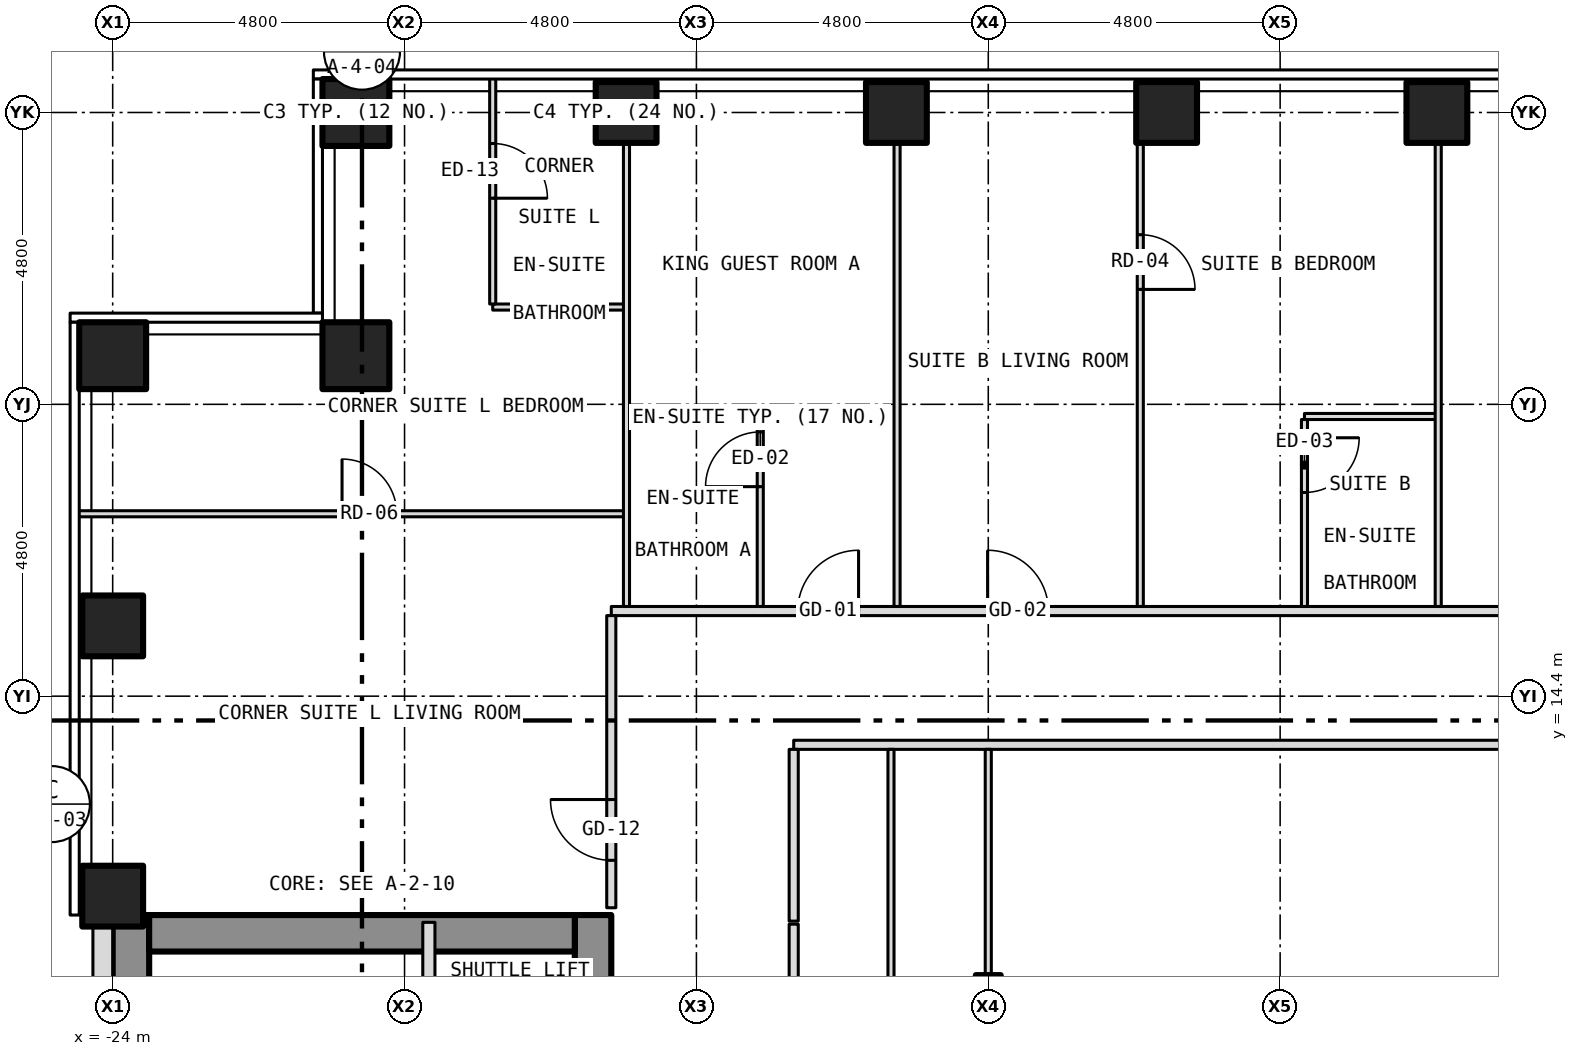
"""IFC4 building model, lengths in metres.
Left out: names, types, materials, properties, quantities, classifications, styles, units other than length and angle.
Written with IfcOpenShell. Run it as: python <this file> out.ifc"""

import sys

from ifc_helpers import new_model, si_unit, direction, frame, frame_2d, origin, origin_2d, place, context, subcontext, project, spatial, rectangle, hollow_rectangle, i_section, extrude, element, fill, save


model = new_model("IFC4")
c1 = context("Model", 3, precision=1e-05, world=origin(), true_north=direction((0.0, 1.0)))
c2 = subcontext(c1, "Body", "Model", "MODEL_VIEW")
j1 = project(units=[si_unit("LENGTHUNIT", "METRE"), si_unit("PLANEANGLEUNIT", "RADIAN")], contexts=[c1])
p1 = place(None, origin())
s1 = spatial("IfcSite", under=j1, at=p1, CompositionType="ELEMENT")
p2 = place(p1, origin())
s2 = spatial("IfcBuilding", under=s1, at=p2, CompositionType="ELEMENT")
p3 = place(p2, frame((0.0, 0.0, 39.0)))
s3 = spatial("IfcBuildingStorey", under=s2, at=p3, CompositionType="ELEMENT", Elevation=39.0)
p4 = place(p3, frame((-20.0, 24.0, -0.15), z_axis=(0.0, 0.0, 1.0), x_axis=(1.0, 0.0, 0.0)))
e1 = element("IfcColumn", 1, at=p4, inside=s3, PredefinedType="COLUMN", context=c2, shape_type="SweptSolid", body=[
    extrude(hollow_rectangle(XDim=1.1, YDim=1.1, WallThickness=0.065, at=origin_2d()), origin(), (0.0, 0.0, 1.0), 3.5),
])
for number, where, z_axis, x_axis in (
    (2, (-15.556, 24.0, -0.15), (0.0, 0.0, 1.0), (1.0, 0.0, 0.0)),
    (3, (-11.111, 24.0, -0.15), (0.0, 0.0, 1.0), (1.0, 0.0, 0.0)),
    (4, (-6.667, 24.0, -0.15), (0.0, 0.0, 1.0), (1.0, 0.0, 0.0)),
    (5, (-2.222, 24.0, -0.15), (0.0, 0.0, 1.0), (1.0, 0.0, 0.0)),
    (6, (-24.0, 11.111, -0.15), (0.0, 0.0, 1.0), (1.0, 0.0, 0.0)),
    (7, (-24.0, 15.556, -0.15), (0.0, 0.0, 1.0), (1.0, 0.0, 0.0)),
):
    element("IfcColumn", number, at=place(p3, frame(where, z_axis=z_axis, x_axis=x_axis)), inside=s3, PredefinedType="COLUMN", context=c2, shape_type="SweptSolid", body=[
        extrude(hollow_rectangle(XDim=1.0, YDim=1.0, WallThickness=0.06, at=origin_2d()), origin(), (0.0, 0.0, 1.0), 3.5),
    ])
for number, where, z_axis, x_axis in (
    (8, (-24.0, 20.0, -0.15), (0.0, 0.0, 1.0), (1.0, 0.0, 0.0)),
    (9, (-20.0, 20.0, -0.15), (0.0, 0.0, 1.0), (1.0, 0.0, 0.0)),
):
    element("IfcColumn", number, at=place(p3, frame(where, z_axis=z_axis, x_axis=x_axis)), inside=s3, PredefinedType="COLUMN", context=c2, shape_type="SweptSolid", body=[
        extrude(hollow_rectangle(XDim=1.1, YDim=1.1, WallThickness=0.065, at=origin_2d()), origin(), (0.0, 0.0, 1.0), 3.5),
    ])
p5 = place(p3, frame((-9.6, 9.6, -0.15), z_axis=(0.0, 0.0, 1.0), x_axis=(1.0, 0.0, 0.0)))
e10 = element("IfcColumn", 10, at=p5, inside=s3, PredefinedType="COLUMN", context=c2, shape_type="SweptSolid", body=[
    extrude(i_section(OverallWidth=0.409, OverallDepth=0.424, WebThickness=0.033, FlangeThickness=0.052, at=origin_2d()), origin(), (0.0, 0.0, 1.0), 3.5),
])
p6 = place(p3, frame((-16.1, -10.8, 0.0), z_axis=(0.0, 0.0, 1.0), x_axis=(0.0, 1.0, 0.0)))
e11 = element("IfcWall", 11, at=p6, inside=s3, PredefinedType="SHEAR", context=c2, shape_type="SweptSolid", body=[
    extrude(rectangle(XDim=21.6, YDim=0.6, at=frame_2d((10.8, 0.0))), origin(), (0.0, 0.0, 1.0), 3.25),
])
p7 = place(p6, frame((9.4, 0.0, 0.0)))
e12 = element("IfcOpeningElement", 12, at=p7, cuts=e11, PredefinedType="OPENING", context=c2, shape_type="SweptSolid", body=[
    extrude(rectangle(XDim=1.1, YDim=2.1, at=frame_2d((0.55, 1.05))), frame((0.0, 0.312, 0.0), z_axis=(0.0, -1.0, 0.0), x_axis=(1.0, 0.0, 0.0)), (0.0, 0.0, 1.0), 0.624),
])
p8 = place(p6, frame((11.5, 0.0, 0.0)))
e13 = element("IfcOpeningElement", 13, at=p8, cuts=e11, PredefinedType="OPENING", context=c2, shape_type="SweptSolid", body=[
    extrude(rectangle(XDim=1.1, YDim=2.1, at=frame_2d((0.55, 1.05))), frame((0.0, 0.312, 0.0), z_axis=(0.0, -1.0, 0.0), x_axis=(1.0, 0.0, 0.0)), (0.0, 0.0, 1.0), 0.624),
])
p9 = place(p6, frame((13.6, 0.0, 0.0)))
e14 = element("IfcOpeningElement", 14, at=p9, cuts=e11, PredefinedType="OPENING", context=c2, shape_type="SweptSolid", body=[
    extrude(rectangle(XDim=1.1, YDim=2.1, at=frame_2d((0.55, 1.05))), frame((0.0, 0.312, 0.0), z_axis=(0.0, -1.0, 0.0), x_axis=(1.0, 0.0, 0.0)), (0.0, 0.0, 1.0), 0.624),
])
p10 = place(p6, frame((15.7, 0.0, 0.0)))
e15 = element("IfcOpeningElement", 15, at=p10, cuts=e11, PredefinedType="OPENING", context=c2, shape_type="SweptSolid", body=[
    extrude(rectangle(XDim=1.1, YDim=2.1, at=frame_2d((0.55, 1.05))), frame((0.0, 0.312, 0.0), z_axis=(0.0, -1.0, 0.0), x_axis=(1.0, 0.0, 0.0)), (0.0, 0.0, 1.0), 0.624),
])
p11 = place(p6, frame((17.8, 0.0, 0.0)))
e16 = element("IfcOpeningElement", 16, at=p11, cuts=e11, PredefinedType="OPENING", context=c2, shape_type="SweptSolid", body=[
    extrude(rectangle(XDim=1.1, YDim=2.1, at=frame_2d((0.55, 1.05))), frame((0.0, 0.312, 0.0), z_axis=(0.0, -1.0, 0.0), x_axis=(1.0, 0.0, 0.0)), (0.0, 0.0, 1.0), 0.624),
])
p12 = place(p6, frame((0.758, 0.0, 0.0)))
e17 = element("IfcOpeningElement", 17, at=p12, cuts=e11, PredefinedType="OPENING", context=c2, shape_type="SweptSolid", body=[
    extrude(rectangle(XDim=1.1, YDim=2.1, at=frame_2d((0.55, 1.05))), frame((0.0, 0.312, 0.0), z_axis=(0.0, -1.0, 0.0), x_axis=(1.0, 0.0, 0.0)), (0.0, 0.0, 1.0), 0.624),
])
p13 = place(p6, frame((7.5, 0.0, 0.0)))
e18 = element("IfcOpeningElement", 18, at=p13, cuts=e11, PredefinedType="OPENING", context=c2, shape_type="SweptSolid", body=[
    extrude(rectangle(XDim=1.1, YDim=2.1, at=frame_2d((0.55, 1.05))), frame((0.0, 0.312, 0.0), z_axis=(0.0, -1.0, 0.0), x_axis=(1.0, 0.0, 0.0)), (0.0, 0.0, 1.0), 0.624),
])
p14 = place(p3, frame((-23.7, -10.8, 0.0), z_axis=(0.0, 0.0, 1.0), x_axis=(0.0, 1.0, 0.0)))
e19 = element("IfcWall", 19, at=p14, inside=s3, PredefinedType="SHEAR", context=c2, shape_type="SweptSolid", body=[
    extrude(rectangle(XDim=21.6, YDim=0.6, at=frame_2d((10.8, 0.0))), origin(), (0.0, 0.0, 1.0), 3.25),
])
p15 = place(p3, frame((-23.4, 10.5, 0.0), z_axis=(0.0, 0.0, 1.0), x_axis=(1.0, 0.0, 0.0)))
e20 = element("IfcWall", 20, at=p15, inside=s3, PredefinedType="SHEAR", context=c2, shape_type="SweptSolid", body=[
    extrude(rectangle(XDim=7.0, YDim=0.6, at=frame_2d((3.5, 0.0))), origin(), (0.0, 0.0, 1.0), 3.25),
])
p16 = place(p3, frame((-24.163, 10.8, 0.0), z_axis=(0.0, 0.0, 1.0), x_axis=(0.0, -1.0, 0.0)))
e21 = element("IfcWall", 21, at=p16, inside=s3, PredefinedType="SOLIDWALL", context=c2, shape_type="SweptSolid", body=[
    extrude(rectangle(XDim=21.6, YDim=0.325, at=frame_2d((10.8, 0.0))), origin(), (0.0, 0.0, 1.0), 3.5),
])
p17 = place(p16, frame((18.05, 0.0, 1.0)))
e22 = element("IfcOpeningElement", 22, at=p17, cuts=e21, PredefinedType="OPENING", context=c2, shape_type="SweptSolid", body=[
    extrude(rectangle(XDim=0.6, YDim=1.5, at=frame_2d((0.3, 0.75))), frame((0.0, 0.175, 0.0), z_axis=(0.0, -1.0, 0.0), x_axis=(1.0, 0.0, 0.0)), (0.0, 0.0, 1.0), 0.349),
])
p18 = place(p3, frame((-12.8, 13.6, 0.0), z_axis=(0.0, 0.0, 1.0), x_axis=(1.0, 0.0, 0.0)))
e23 = element("IfcWall", 23, at=p18, inside=s3, PredefinedType="PARTITIONING", context=c2, shape_type="SweptSolid", body=[
    extrude(rectangle(XDim=25.6, YDim=0.15, at=frame_2d((12.8, 0.0))), origin(), (0.0, 0.0, 1.0), 3.35),
])
p19 = place(p18, frame((12.35, 0.0, 0.0)))
e24 = element("IfcOpeningElement", 24, at=p19, cuts=e23, PredefinedType="OPENING", context=c2, shape_type="SweptSolid", body=[
    extrude(rectangle(XDim=0.9, YDim=2.1, at=frame_2d((0.45, 1.05))), frame((0.0, 0.087, 0.0), z_axis=(0.0, -1.0, 0.0), x_axis=(1.0, 0.0, 0.0)), (0.0, 0.0, 1.0), 0.174),
])
p20 = place(p3, frame((-15.8, 15.8, 0.0), z_axis=(0.0, 0.0, 1.0), x_axis=(1.0, 0.0, 0.0)))
e25 = element("IfcWall", 25, at=p20, inside=s3, PredefinedType="PARTITIONING", context=c2, shape_type="SweptSolid", body=[
    extrude(rectangle(XDim=31.6, YDim=0.15, at=frame_2d((15.8, 0.0))), origin(), (0.0, 0.0, 1.0), 3.35),
])
p21 = place(p20, frame((3.067, 0.0, 0.0)))
e26 = element("IfcOpeningElement", 26, at=p21, cuts=e25, PredefinedType="OPENING", context=c2, shape_type="SweptSolid", body=[
    extrude(rectangle(XDim=1.0, YDim=2.1, at=frame_2d((0.5, 1.05))), frame((0.0, 0.087, 0.0), z_axis=(0.0, -1.0, 0.0), x_axis=(1.0, 0.0, 0.0)), (0.0, 0.0, 1.0), 0.174),
])
p22 = place(p20, frame((6.189, 0.0, 0.0)))
e27 = element("IfcOpeningElement", 27, at=p22, cuts=e25, PredefinedType="OPENING", context=c2, shape_type="SweptSolid", body=[
    extrude(rectangle(XDim=1.0, YDim=2.1, at=frame_2d((0.5, 1.05))), frame((0.0, 0.087, 0.0), z_axis=(0.0, -1.0, 0.0), x_axis=(1.0, 0.0, 0.0)), (0.0, 0.0, 1.0), 0.174),
])
p23 = place(p20, frame((15.311, 0.0, 0.0)))
e28 = element("IfcOpeningElement", 28, at=p23, cuts=e25, PredefinedType="OPENING", context=c2, shape_type="SweptSolid", body=[
    extrude(rectangle(XDim=1.0, YDim=2.1, at=frame_2d((0.5, 1.05))), frame((0.0, 0.087, 0.0), z_axis=(0.0, -1.0, 0.0), x_axis=(1.0, 0.0, 0.0)), (0.0, 0.0, 1.0), 0.174),
])
p24 = place(p20, frame((21.977, 0.0, 0.0)))
e29 = element("IfcOpeningElement", 29, at=p24, cuts=e25, PredefinedType="OPENING", context=c2, shape_type="SweptSolid", body=[
    extrude(rectangle(XDim=1.0, YDim=2.1, at=frame_2d((0.5, 1.05))), frame((0.0, 0.087, 0.0), z_axis=(0.0, -1.0, 0.0), x_axis=(1.0, 0.0, 0.0)), (0.0, 0.0, 1.0), 0.174),
])
p25 = place(p20, frame((27.534, 0.0, 0.0)))
e30 = element("IfcOpeningElement", 30, at=p25, cuts=e25, PredefinedType="OPENING", context=c2, shape_type="SweptSolid", body=[
    extrude(rectangle(XDim=1.0, YDim=2.1, at=frame_2d((0.5, 1.05))), frame((0.0, 0.087, 0.0), z_axis=(0.0, -1.0, 0.0), x_axis=(1.0, 0.0, 0.0)), (0.0, 0.0, 1.0), 0.174),
])
p26 = place(p3, frame((-24.58, 17.4, 0.0), z_axis=(0.0, 0.0, 1.0), x_axis=(1.0, 0.0, 0.0)))
e31 = element("IfcWall", 31, at=p26, inside=s3, PredefinedType="PARTITIONING", context=c2, shape_type="SweptSolid", body=[
    extrude(rectangle(XDim=9.03, YDim=0.1, at=frame_2d((4.515, 0.0))), origin(), (0.0, 0.0, 1.0), 3.35),
])
p27 = place(p26, frame((4.352, 0.0, 0.0)))
e32 = element("IfcOpeningElement", 32, at=p27, cuts=e31, PredefinedType="OPENING", context=c2, shape_type="SweptSolid", body=[
    extrude(rectangle(XDim=0.9, YDim=2.1, at=frame_2d((0.45, 1.05))), frame((0.0, 0.062, 0.0), z_axis=(0.0, -1.0, 0.0), x_axis=(1.0, 0.0, 0.0)), (0.0, 0.0, 1.0), 0.124),
])
for number, where, z_axis, x_axis in (
    (33, (-15.55, 19.0, 0.0), (0.0, 0.0, 1.0), (1.0, 0.0, 0.0)),
    (34, (-4.4, 19.0, 0.0), (0.0, 0.0, 1.0), (1.0, 0.0, 0.0)),
    (35, (-17.75, 20.8, 0.0), (0.0, 0.0, 1.0), (1.0, 0.0, 0.0)),
):
    element("IfcWall", number, at=place(p3, frame(where, z_axis=z_axis, x_axis=x_axis)), inside=s3, PredefinedType="PARTITIONING", context=c2, shape_type="SweptSolid", body=[
        extrude(rectangle(XDim=2.2, YDim=0.1, at=frame_2d((1.1, 0.0))), origin(), (0.0, 0.0, 1.0), 3.35),
    ])
p28 = place(p3, frame((-18.8, -1.8, 0.0), z_axis=(0.0, 0.0, 1.0), x_axis=(0.0, 1.0, 0.0)))
e36 = element("IfcWall", 36, at=p28, inside=s3, PredefinedType="PARTITIONING", context=c2, shape_type="SweptSolid", body=[
    extrude(rectangle(XDim=12.48, YDim=0.2, at=frame_2d((6.24, 0.0))), origin(), (0.0, 0.0, 1.0), 3.25),
])
p29 = place(p3, frame((-17.75, 20.85, 0.0), z_axis=(0.0, 0.0, 1.0), x_axis=(0.0, 1.0, 0.0)))
e37 = element("IfcWall", 37, at=p29, inside=s3, PredefinedType="PARTITIONING", context=c2, shape_type="SweptSolid", body=[
    extrude(rectangle(XDim=3.73, YDim=0.1, at=frame_2d((1.865, 0.0))), origin(), (0.0, 0.0, 1.0), 3.35),
])
p30 = place(p29, frame((1.74, 0.0, 0.0)))
e38 = element("IfcOpeningElement", 38, at=p30, cuts=e37, PredefinedType="OPENING", context=c2, shape_type="SweptSolid", body=[
    extrude(rectangle(XDim=0.9, YDim=2.1, at=frame_2d((0.45, 1.05))), frame((0.0, 0.062, 0.0), z_axis=(0.0, -1.0, 0.0), x_axis=(1.0, 0.0, 0.0)), (0.0, 0.0, 1.0), 0.124),
])
p31 = place(p3, frame((-15.8, 10.92, 0.0), z_axis=(0.0, 0.0, 1.0), x_axis=(0.0, 1.0, 0.0)))
e39 = element("IfcWall", 39, at=p31, inside=s3, PredefinedType="PARTITIONING", context=c2, shape_type="SweptSolid", body=[
    extrude(rectangle(XDim=4.805, YDim=0.15, at=frame_2d((2.403, 0.0))), origin(), (0.0, 0.0, 1.0), 3.35),
])
p32 = place(p31, frame((0.78, 0.0, 0.0)))
e40 = element("IfcOpeningElement", 40, at=p32, cuts=e39, PredefinedType="OPENING", context=c2, shape_type="SweptSolid", body=[
    extrude(rectangle(XDim=1.0, YDim=2.1, at=frame_2d((0.5, 1.05))), frame((0.0, 0.087, 0.0), z_axis=(0.0, -1.0, 0.0), x_axis=(1.0, 0.0, 0.0)), (0.0, 0.0, 1.0), 0.174),
])
p33 = place(p3, frame((-15.55, 15.875, 0.0), z_axis=(0.0, 0.0, 1.0), x_axis=(0.0, 1.0, 0.0)))
e41 = element("IfcWall", 41, at=p33, inside=s3, PredefinedType="PARTITIONING", context=c2, shape_type="SweptSolid", body=[
    extrude(rectangle(XDim=8.005, YDim=0.1, at=frame_2d((4.002, 0.0))), origin(), (0.0, 0.0, 1.0), 3.35),
])
p34 = place(p3, frame((-13.35, 15.875, 0.0), z_axis=(0.0, 0.0, 1.0), x_axis=(0.0, 1.0, 0.0)))
e42 = element("IfcWall", 42, at=p34, inside=s3, PredefinedType="PARTITIONING", context=c2, shape_type="SweptSolid", body=[
    extrude(rectangle(XDim=3.075, YDim=0.1, at=frame_2d((1.538, 0.0))), origin(), (0.0, 0.0, 1.0), 3.35),
])
p35 = place(p34, frame((1.971, 0.0, 0.0)))
e43 = element("IfcOpeningElement", 43, at=p35, cuts=e42, PredefinedType="OPENING", context=c2, shape_type="SweptSolid", body=[
    extrude(rectangle(XDim=0.9, YDim=2.1, at=frame_2d((0.45, 1.05))), frame((0.0, 0.062, 0.0), z_axis=(0.0, -1.0, 0.0), x_axis=(1.0, 0.0, 0.0)), (0.0, 0.0, 1.0), 0.124),
])
p36 = place(p3, frame((-12.8, 3.375, 0.0), z_axis=(0.0, 0.0, 1.0), x_axis=(0.0, 1.0, 0.0)))
e44 = element("IfcWall", 44, at=p36, inside=s3, PredefinedType="PARTITIONING", context=c2, shape_type="SweptSolid", body=[
    extrude(rectangle(XDim=7.275, YDim=0.15, at=frame_2d((3.637, 0.0))), origin(), (0.0, 0.0, 1.0), 3.35),
])
p37 = place(p36, frame((3.175, 0.0, 0.0)))
e45 = element("IfcOpeningElement", 45, at=p37, cuts=e44, PredefinedType="OPENING", context=c2, shape_type="SweptSolid", body=[
    extrude(rectangle(XDim=0.9, YDim=2.1, at=frame_2d((0.45, 1.05))), frame((0.0, 0.087, 0.0), z_axis=(0.0, -1.0, 0.0), x_axis=(1.0, 0.0, 0.0)), (0.0, 0.0, 1.0), 0.174),
])
p38 = place(p3, frame((-12.8, 10.7, 0.0), z_axis=(0.0, 0.0, 1.0), x_axis=(0.0, 1.0, 0.0)))
e46 = element("IfcWall", 46, at=p38, inside=s3, PredefinedType="PARTITIONING", context=c2, shape_type="SweptSolid", body=[
    extrude(rectangle(XDim=2.825, YDim=0.15, at=frame_2d((1.413, 0.0))), origin(), (0.0, 0.0, 1.0), 3.35),
])
p39 = place(p3, frame((-11.2, 3.375, 0.0), z_axis=(0.0, 0.0, 1.0), x_axis=(0.0, 1.0, 0.0)))
e47 = element("IfcWall", 47, at=p39, inside=s3, PredefinedType="PARTITIONING", context=c2, shape_type="SweptSolid", body=[
    extrude(rectangle(XDim=10.15, YDim=0.1, at=frame_2d((5.075, 0.0))), origin(), (0.0, 0.0, 1.0), 3.35),
])
p40 = place(p3, frame((-11.1, 15.875, 0.0), z_axis=(0.0, 0.0, 1.0), x_axis=(0.0, 1.0, 0.0)))
e48 = element("IfcWall", 48, at=p40, inside=s3, PredefinedType="PARTITIONING", context=c2, shape_type="SweptSolid", body=[
    extrude(rectangle(XDim=8.005, YDim=0.1, at=frame_2d((4.002, 0.0))), origin(), (0.0, 0.0, 1.0), 3.35),
])
p41 = place(p3, frame((-9.6, 9.396, 0.0), z_axis=(0.0, 0.0, 1.0), x_axis=(0.0, 1.0, 0.0)))
e49 = element("IfcWall", 49, at=p41, inside=s3, PredefinedType="PARTITIONING", context=c2, shape_type="SweptSolid", body=[
    extrude(rectangle(XDim=0.408, YDim=0.1, at=frame_2d((0.204, 0.0))), origin(), (0.0, 0.0, 1.0), 3.35),
])
p42 = place(p3, frame((-9.6, 9.804, 0.0), z_axis=(0.0, 0.0, 1.0), x_axis=(0.0, 1.0, 0.0)))
e50 = element("IfcWall", 50, at=p42, inside=s3, PredefinedType="PARTITIONING", context=c2, shape_type="SweptSolid", body=[
    extrude(rectangle(XDim=3.721, YDim=0.1, at=frame_2d((1.86, 0.0))), origin(), (0.0, 0.0, 1.0), 2.728),
])
p43 = place(p3, frame((-7.1, 15.875, 0.0), z_axis=(0.0, 0.0, 1.0), x_axis=(0.0, 1.0, 0.0)))
e51 = element("IfcWall", 51, at=p43, inside=s3, PredefinedType="PARTITIONING", context=c2, shape_type="SweptSolid", body=[
    extrude(rectangle(XDim=8.005, YDim=0.1, at=frame_2d((4.002, 0.0))), origin(), (0.0, 0.0, 1.0), 3.35),
])
p44 = place(p43, frame((5.215, 0.0, 0.0)))
e52 = element("IfcOpeningElement", 52, at=p44, cuts=e51, PredefinedType="OPENING", context=c2, shape_type="SweptSolid", body=[
    extrude(rectangle(XDim=0.9, YDim=2.1, at=frame_2d((0.45, 1.05))), frame((0.0, 0.062, 0.0), z_axis=(0.0, -1.0, 0.0), x_axis=(1.0, 0.0, 0.0)), (0.0, 0.0, 1.0), 0.124),
])
p45 = place(p3, frame((-4.4, 15.875, 0.0), z_axis=(0.0, 0.0, 1.0), x_axis=(0.0, 1.0, 0.0)))
e53 = element("IfcWall", 53, at=p45, inside=s3, PredefinedType="PARTITIONING", context=c2, shape_type="SweptSolid", body=[
    extrude(rectangle(XDim=3.075, YDim=0.1, at=frame_2d((1.538, 0.0))), origin(), (0.0, 0.0, 1.0), 3.35),
])
p46 = place(p45, frame((1.875, 0.0, 0.0)))
e54 = element("IfcOpeningElement", 54, at=p46, cuts=e53, PredefinedType="OPENING", context=c2, shape_type="SweptSolid", body=[
    extrude(rectangle(XDim=0.9, YDim=2.1, at=frame_2d((0.45, 1.05))), frame((0.0, 0.062, 0.0), z_axis=(0.0, -1.0, 0.0), x_axis=(1.0, 0.0, 0.0)), (0.0, 0.0, 1.0), 0.124),
])
p47 = place(p3, frame((-2.2, 15.875, 0.0), z_axis=(0.0, 0.0, 1.0), x_axis=(0.0, 1.0, 0.0)))
e55 = element("IfcWall", 55, at=p47, inside=s3, PredefinedType="PARTITIONING", context=c2, shape_type="SweptSolid", body=[
    extrude(rectangle(XDim=8.005, YDim=0.1, at=frame_2d((4.002, 0.0))), origin(), (0.0, 0.0, 1.0), 3.35),
])
p48 = place(p21, origin())
e56 = element("IfcDoor", 56, at=p48, inside=s3, OperationType="SINGLE_SWING_RIGHT", PredefinedType="DOOR", context=c2, shape_type="SweptSolid", body=[
    extrude(rectangle(XDim=1.0, YDim=2.1, at=frame_2d((0.5, 1.05))), frame((0.0, 0.025, 0.0), z_axis=(0.0, -1.0, 0.0), x_axis=(1.0, 0.0, 0.0)), (0.0, 0.0, 1.0), 0.05),
])
fill(e26, e56)
p49 = place(p35, origin())
e57 = element("IfcDoor", 57, at=p49, inside=s3, OperationType="SINGLE_SWING_LEFT", PredefinedType="DOOR", context=c2, shape_type="SweptSolid", body=[
    extrude(rectangle(XDim=0.9, YDim=2.1, at=frame_2d((0.45, 1.05))), frame((0.0, 0.025, 0.0), z_axis=(0.0, -1.0, 0.0), x_axis=(1.0, 0.0, 0.0)), (0.0, 0.0, 1.0), 0.05),
])
fill(e43, e57)
p50 = place(p22, origin())
e58 = element("IfcDoor", 58, at=p50, inside=s3, OperationType="SINGLE_SWING_LEFT", PredefinedType="DOOR", context=c2, shape_type="SweptSolid", body=[
    extrude(rectangle(XDim=1.0, YDim=2.1, at=frame_2d((0.5, 1.05))), frame((0.0, 0.025, 0.0), z_axis=(0.0, -1.0, 0.0), x_axis=(1.0, 0.0, 0.0)), (0.0, 0.0, 1.0), 0.05),
])
fill(e27, e58)
p51 = place(p44, origin())
e59 = element("IfcDoor", 59, at=p51, inside=s3, OperationType="SINGLE_SWING_LEFT", PredefinedType="DOOR", context=c2, shape_type="SweptSolid", body=[
    extrude(rectangle(XDim=0.9, YDim=2.1, at=frame_2d((0.45, 1.05))), frame((0.0, 0.025, 0.0), z_axis=(0.0, -1.0, 0.0), x_axis=(1.0, 0.0, 0.0)), (0.0, 0.0, 1.0), 0.05),
])
fill(e52, e59)
p52 = place(p46, origin())
e60 = element("IfcDoor", 60, at=p52, inside=s3, OperationType="SINGLE_SWING_RIGHT", PredefinedType="DOOR", context=c2, shape_type="SweptSolid", body=[
    extrude(rectangle(XDim=0.9, YDim=2.1, at=frame_2d((0.45, 1.05))), frame((0.0, 0.025, 0.0), z_axis=(0.0, -1.0, 0.0), x_axis=(1.0, 0.0, 0.0)), (0.0, 0.0, 1.0), 0.05),
])
fill(e54, e60)
p53 = place(p32, origin())
e61 = element("IfcDoor", 61, at=p53, inside=s3, OperationType="SINGLE_SWING_RIGHT", PredefinedType="DOOR", context=c2, shape_type="SweptSolid", body=[
    extrude(rectangle(XDim=1.0, YDim=2.1, at=frame_2d((0.5, 1.05))), frame((0.0, 0.025, 0.0), z_axis=(0.0, -1.0, 0.0), x_axis=(1.0, 0.0, 0.0)), (0.0, 0.0, 1.0), 0.05),
])
fill(e40, e61)
p54 = place(p27, origin())
e62 = element("IfcDoor", 62, at=p54, inside=s3, OperationType="SINGLE_SWING_LEFT", PredefinedType="DOOR", context=c2, shape_type="SweptSolid", body=[
    extrude(rectangle(XDim=0.9, YDim=2.1, at=frame_2d((0.45, 1.05))), frame((0.0, 0.025, 0.0), z_axis=(0.0, -1.0, 0.0), x_axis=(1.0, 0.0, 0.0)), (0.0, 0.0, 1.0), 0.05),
])
fill(e32, e62)
p55 = place(p30, origin())
e63 = element("IfcDoor", 63, at=p55, inside=s3, OperationType="SINGLE_SWING_LEFT", PredefinedType="DOOR", context=c2, shape_type="SweptSolid", body=[
    extrude(rectangle(XDim=0.9, YDim=2.1, at=frame_2d((0.45, 1.05))), frame((0.0, 0.025, 0.0), z_axis=(0.0, -1.0, 0.0), x_axis=(1.0, 0.0, 0.0)), (0.0, 0.0, 1.0), 0.05),
])
fill(e38, e63)
save(model, sys.argv[1])
